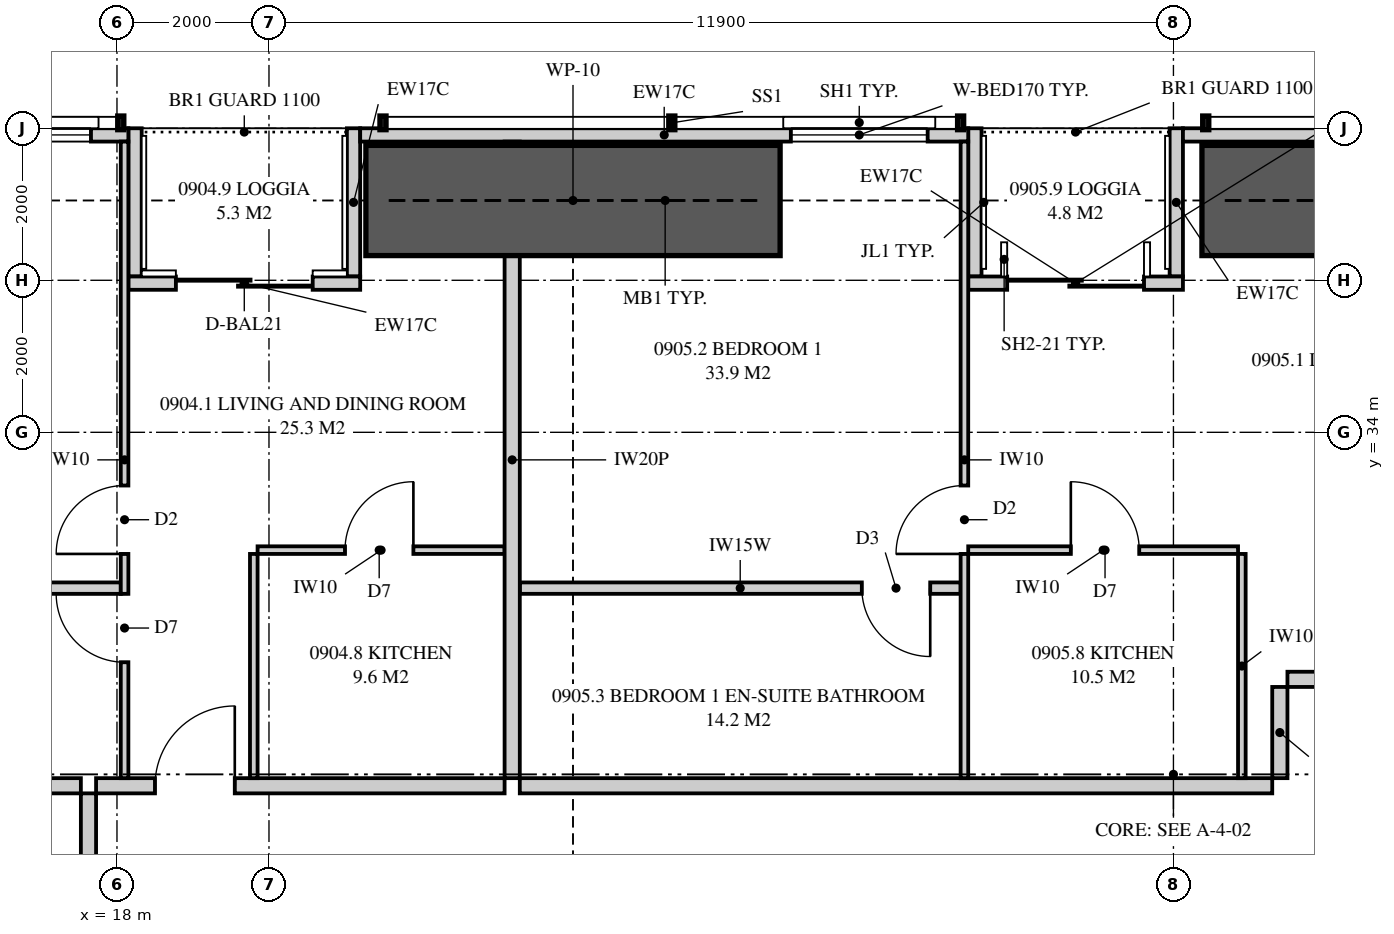
"""IFC4 building model, lengths in metres.
Left out: names, types, materials, properties, quantities, classifications, styles, units other than length and angle.
Written with IfcOpenShell. Run it as: python <this file> out.ifc"""

import sys

from ifc_helpers import new_model, si_unit, direction, frame, frame_2d, origin, place, context, subcontext, project, spatial, polyline, rectangle, outline, extrude, element, fill, save


model = new_model("IFC4")
c1 = context("Model", 3, precision=1e-05, world=origin(), true_north=direction((0.0, 1.0)))
c2 = subcontext(c1, "Body", "Model", "MODEL_VIEW")
j1 = project(units=[si_unit("LENGTHUNIT", "METRE"), si_unit("PLANEANGLEUNIT", "RADIAN")], contexts=[c1])
p1 = place(None, origin())
s1 = spatial("IfcSite", under=j1, at=p1, CompositionType="ELEMENT")
p2 = place(p1, origin())
s2 = spatial("IfcBuilding", under=s1, at=p2, CompositionType="ELEMENT")
p3 = place(p2, frame((0.0, 0.0, 37.75)))
s3 = spatial("IfcBuildingStorey", under=s2, at=p3, CompositionType="ELEMENT", Elevation=37.75)
p4 = place(p3, frame((42.949, 37.913, 0.0), z_axis=(0.0, 0.0, 1.0), x_axis=(-1.0, 0.0, 0.0)))
e1 = element("IfcWall", 1, at=p4, inside=s3, PredefinedType="SOLIDWALL", context=c2, shape_type="SweptSolid", body=[
    extrude(outline(polyline([(0.0, 0.0), (10.924, 0.0), (10.924, 2.15), (7.949, 2.15), (7.949, 3.11), (7.793, 3.11), (7.793, 2.15), (7.745, 2.15), (7.745, 3.11), (0.0, 3.11), (0.0, 0.0)])), frame((0.0, 0.087, 0.0), z_axis=(0.0, -1.0, 0.0), x_axis=(1.0, 0.0, 0.0)), (0.0, 0.0, 1.0), 0.175),
])
p5 = place(p4, frame((2.199, 0.0, 0.4)))
e2 = element("IfcOpeningElement", 2, at=p5, cuts=e1, PredefinedType="OPENING", context=c2, shape_type="SweptSolid", body=[
    extrude(rectangle(XDim=1.8, YDim=1.7, at=frame_2d((0.9, 0.85))), frame((0.0, 0.097, 0.0), z_axis=(0.0, -1.0, 0.0), x_axis=(1.0, 0.0, 0.0)), (0.0, 0.0, 1.0), 0.195),
])
p6 = place(p3, frame((29.2, 37.913, 0.0), z_axis=(0.0, 0.0, 1.0), x_axis=(-1.0, 0.0, 0.0)))
e3 = element("IfcWall", 3, at=p6, inside=s3, PredefinedType="SOLIDWALL", context=c2, shape_type="SweptSolid", body=[
    extrude(rectangle(XDim=8.0, YDim=0.175, at=frame_2d((4.0, 0.0))), origin(), (0.0, 0.0, 1.0), 2.15),
])
p7 = place(p6, frame((0.534, 0.0, 0.4)))
e4 = element("IfcOpeningElement", 4, at=p7, cuts=e3, PredefinedType="OPENING", context=c2, shape_type="SweptSolid", body=[
    extrude(rectangle(XDim=1.8, YDim=1.7, at=frame_2d((0.9, 0.85))), frame((0.0, 0.097, 0.0), z_axis=(0.0, -1.0, 0.0), x_axis=(1.0, 0.0, 0.0)), (0.0, 0.0, 1.0), 0.195),
])
p8 = place(p3, frame((18.15, 37.913, 0.0), z_axis=(0.0, 0.0, 1.0), x_axis=(-1.0, 0.0, 0.0)))
e5 = element("IfcWall", 5, at=p8, inside=s3, PredefinedType="SOLIDWALL", context=c2, shape_type="SweptSolid", body=[
    extrude(outline(polyline([(0.0, 0.0), (13.099, 0.0), (13.099, 3.11), (5.354, 3.11), (5.354, 2.15), (5.306, 2.15), (5.306, 3.11), (5.15, 3.11), (5.15, 2.15), (0.0, 2.15), (0.0, 0.0)])), frame((0.0, 0.087, 0.0), z_axis=(0.0, -1.0, 0.0), x_axis=(1.0, 0.0, 0.0)), (0.0, 0.0, 1.0), 0.175),
])
p9 = place(p8, frame((0.492, 0.0, 0.4)))
e6 = element("IfcOpeningElement", 6, at=p9, cuts=e5, PredefinedType="OPENING", context=c2, shape_type="SweptSolid", body=[
    extrude(rectangle(XDim=1.8, YDim=1.7, at=frame_2d((0.9, 0.85))), frame((0.0, 0.097, 0.0), z_axis=(0.0, -1.0, 0.0), x_axis=(1.0, 0.0, 0.0)), (0.0, 0.0, 1.0), 0.195),
])
p10 = place(p8, frame((7.98, 0.0, 0.4)))
e7 = element("IfcOpeningElement", 7, at=p10, cuts=e5, PredefinedType="OPENING", context=c2, shape_type="SweptSolid", body=[
    extrude(rectangle(XDim=1.8, YDim=1.7, at=frame_2d((0.9, 0.85))), frame((0.0, 0.097, 0.0), z_axis=(0.0, -1.0, 0.0), x_axis=(1.0, 0.0, 0.0)), (0.0, 0.0, 1.0), 0.195),
])
p11 = place(p3, frame((32.025, 35.962, 0.0), z_axis=(0.0, 0.0, 1.0), x_axis=(-1.0, 0.0, 0.0)))
e8 = element("IfcWall", 8, at=p11, inside=s3, PredefinedType="SOLIDWALL", context=c2, shape_type="SweptSolid", body=[
    extrude(rectangle(XDim=2.825, YDim=0.175, at=frame_2d((1.413, 0.0))), origin(), (0.0, 0.0, 1.0), 3.11),
])
p12 = place(p11, frame((0.512, 0.0, 0.0)))
e9 = element("IfcOpeningElement", 9, at=p12, cuts=e8, PredefinedType="OPENING", context=c2, shape_type="SweptSolid", body=[
    extrude(rectangle(XDim=1.8, YDim=2.1, at=frame_2d((0.9, 1.05))), frame((0.0, 0.097, 0.0), z_axis=(0.0, -1.0, 0.0), x_axis=(1.0, 0.0, 0.0)), (0.0, 0.0, 1.0), 0.195),
])
for number, where, z_axis, x_axis in (
    (10, (31.938, 38.0, 0.0), (0.0, 0.0, 1.0), (0.0, -1.0, 0.0)),
    (11, (29.288, 38.0, 0.0), (0.0, 0.0, 1.0), (0.0, -1.0, 0.0)),
):
    element("IfcWall", number, at=place(p3, frame(where, z_axis=z_axis, x_axis=x_axis)), inside=s3, PredefinedType="SOLIDWALL", context=c2, shape_type="SweptSolid", body=[
        extrude(outline(polyline([(0.0, 0.0), (1.95, 0.0), (1.95, 3.11), (1.75, 3.11), (1.75, 2.15), (0.15, 2.15), (0.15, 3.11), (0.0, 3.11), (0.0, 0.0)])), frame((0.0, 0.087, 0.0), z_axis=(0.0, -1.0, 0.0), x_axis=(1.0, 0.0, 0.0)), (0.0, 0.0, 1.0), 0.175),
    ])
p13 = place(p3, frame((21.2, 35.962, 0.0), z_axis=(0.0, 0.0, 1.0), x_axis=(-1.0, 0.0, 0.0)))
e12 = element("IfcWall", 12, at=p13, inside=s3, PredefinedType="SOLIDWALL", context=c2, shape_type="SweptSolid", body=[
    extrude(rectangle(XDim=3.05, YDim=0.175, at=frame_2d((1.525, 0.0))), origin(), (0.0, 0.0, 1.0), 3.11),
])
p14 = place(p13, frame((0.625, 0.0, 0.0)))
e13 = element("IfcOpeningElement", 13, at=p14, cuts=e12, PredefinedType="OPENING", context=c2, shape_type="SweptSolid", body=[
    extrude(rectangle(XDim=1.8, YDim=2.1, at=frame_2d((0.9, 1.05))), frame((0.0, 0.097, 0.0), z_axis=(0.0, -1.0, 0.0), x_axis=(1.0, 0.0, 0.0)), (0.0, 0.0, 1.0), 0.195),
])
for number, where, z_axis, x_axis in (
    (14, (21.113, 38.0, 0.0), (0.0, 0.0, 1.0), (0.0, -1.0, 0.0)),
    (15, (18.238, 38.0, 0.0), (0.0, 0.0, 1.0), (0.0, -1.0, 0.0)),
):
    element("IfcWall", number, at=place(p3, frame(where, z_axis=z_axis, x_axis=x_axis)), inside=s3, PredefinedType="SOLIDWALL", context=c2, shape_type="SweptSolid", body=[
        extrude(outline(polyline([(0.0, 0.0), (1.95, 0.0), (1.95, 3.11), (1.75, 3.11), (1.75, 2.15), (0.15, 2.15), (0.15, 3.11), (0.0, 3.11), (0.0, 0.0)])), frame((0.0, 0.087, 0.0), z_axis=(0.0, -1.0, 0.0), x_axis=(1.0, 0.0, 0.0)), (0.0, 0.0, 1.0), 0.175),
    ])
p15 = place(p3, frame((23.2, 37.825, 0.0), z_axis=(0.0, 0.0, 1.0), x_axis=(0.0, -1.0, 0.0)))
e16 = element("IfcWall", 16, at=p15, inside=s3, PredefinedType="PARTITIONING", context=c2, shape_type="SweptSolid", body=[
    extrude(outline(polyline([(0.529, 2.15), (0.0, 2.15), (0.0, 0.0), (0.529, 0.0), (0.529, 0.953), (1.021, 0.953), (1.021, 0.0), (8.375, 0.0), (8.375, 3.11), (1.685, 3.11), (1.685, 2.15), (1.021, 2.15), (1.021, 1.197), (0.529, 1.197), (0.529, 2.15)])), frame((0.0, 0.1, 0.0), z_axis=(0.0, -1.0, 0.0), x_axis=(1.0, 0.0, 0.0)), (0.0, 0.0, 1.0), 0.2),
])
p16 = place(p3, frame((17.725, 29.35, 0.0), z_axis=(0.0, 0.0, 1.0), x_axis=(1.0, 0.0, 0.0)))
e17 = element("IfcWall", 17, at=p16, inside=s3, PredefinedType="PARTITIONING", context=c2, shape_type="SweptSolid", body=[
    extrude(rectangle(XDim=5.375, YDim=0.2, at=frame_2d((2.688, 0.0))), origin(), (0.0, 0.0, 1.0), 3.11),
])
p17 = place(p16, frame((0.775, 0.0, 0.0)))
e18 = element("IfcOpeningElement", 18, at=p17, cuts=e17, PredefinedType="OPENING", context=c2, shape_type="SweptSolid", body=[
    extrude(rectangle(XDim=1.05, YDim=2.2, at=frame_2d((0.525, 1.1))), frame((0.0, 0.11, 0.0), z_axis=(0.0, -1.0, 0.0), x_axis=(1.0, 0.0, 0.0)), (0.0, 0.0, 1.0), 0.22),
])
p18 = place(p3, frame((18.1, 37.825, 0.0), z_axis=(0.0, 0.0, 1.0), x_axis=(0.0, -1.0, 0.0)))
e19 = element("IfcWall", 19, at=p18, inside=s3, PredefinedType="PARTITIONING", context=c2, shape_type="SweptSolid", body=[
    extrude(outline(polyline([(0.0, 0.0), (8.375, 0.0), (8.375, 3.11), (1.635, 3.11), (1.635, 2.15), (0.0, 2.15), (0.0, 3.11), (0.0, 0.0)])), frame((0.0, 0.05, 0.0), z_axis=(0.0, -1.0, 0.0), x_axis=(1.0, 0.0, 0.0)), (0.0, 0.0, 1.0), 0.1),
])
p19 = place(p18, frame((4.525, 0.0, 0.0)))
e20 = element("IfcOpeningElement", 20, at=p19, cuts=e19, PredefinedType="OPENING", context=c2, shape_type="SweptSolid", body=[
    extrude(rectangle(XDim=0.9, YDim=2.1, at=frame_2d((0.45, 1.05))), frame((0.0, 0.06, 0.0), z_axis=(0.0, -1.0, 0.0), x_axis=(1.0, 0.0, 0.0)), (0.0, 0.0, 1.0), 0.12),
])
p20 = place(p18, frame((5.95, 0.0, 0.0)))
e21 = element("IfcOpeningElement", 21, at=p20, cuts=e19, PredefinedType="OPENING", context=c2, shape_type="SweptSolid", body=[
    extrude(rectangle(XDim=0.9, YDim=2.1, at=frame_2d((0.45, 1.05))), frame((0.0, 0.06, 0.0), z_axis=(0.0, -1.0, 0.0), x_axis=(1.0, 0.0, 0.0)), (0.0, 0.0, 1.0), 0.12),
])
p21 = place(p3, frame((13.85, 31.95, 0.0), z_axis=(0.0, 0.0, 1.0), x_axis=(1.0, 0.0, 0.0)))
e22 = element("IfcWall", 22, at=p21, inside=s3, PredefinedType="PLUMBINGWALL", context=c2, shape_type="SweptSolid", body=[
    extrude(rectangle(XDim=4.2, YDim=0.15, at=frame_2d((2.1, 0.0))), origin(), (0.0, 0.0, 1.0), 3.11),
])
p22 = place(p3, frame((19.85, 32.45, 0.0), z_axis=(0.0, 0.0, 1.0), x_axis=(1.0, 0.0, 0.0)))
e23 = element("IfcWall", 23, at=p22, inside=s3, PredefinedType="PARTITIONING", context=c2, shape_type="SweptSolid", body=[
    extrude(rectangle(XDim=3.25, YDim=0.1, at=frame_2d((1.625, 0.0))), origin(), (0.0, 0.0, 1.0), 3.11),
])
p23 = place(p22, frame((1.15, 0.0, 0.0)))
e24 = element("IfcOpeningElement", 24, at=p23, cuts=e23, PredefinedType="OPENING", context=c2, shape_type="SweptSolid", body=[
    extrude(rectangle(XDim=0.9, YDim=2.1, at=frame_2d((0.45, 1.05))), frame((0.0, 0.06, 0.0), z_axis=(0.0, -1.0, 0.0), x_axis=(1.0, 0.0, 0.0)), (0.0, 0.0, 1.0), 0.12),
])
p24 = place(p3, frame((19.8, 32.4, 0.0), z_axis=(0.0, 0.0, 1.0), x_axis=(0.0, -1.0, 0.0)))
e25 = element("IfcWall", 25, at=p24, inside=s3, PredefinedType="PARTITIONING", context=c2, shape_type="SweptSolid", body=[
    extrude(rectangle(XDim=2.95, YDim=0.1, at=frame_2d((1.475, 0.0))), origin(), (0.0, 0.0, 1.0), 3.11),
])
p25 = place(p3, frame((23.3, 29.35, 0.0), z_axis=(0.0, 0.0, 1.0), x_axis=(1.0, 0.0, 0.0)))
e26 = element("IfcWall", 26, at=p25, inside=s3, PredefinedType="PARTITIONING", context=c2, shape_type="SweptSolid", body=[
    extrude(outline(polyline([(0.0, 0.0), (9.9, 0.0), (9.9, 3.11), (1.037, 3.11), (1.037, 2.541), (0.363, 2.541), (0.363, 3.11), (0.0, 3.11), (0.0, 0.0)])), frame((0.0, 0.1, 0.0), z_axis=(0.0, -1.0, 0.0), x_axis=(1.0, 0.0, 0.0)), (0.0, 0.0, 1.0), 0.2),
])
p26 = place(p3, frame((29.15, 37.825, 0.0), z_axis=(0.0, 0.0, 1.0), x_axis=(0.0, -1.0, 0.0)))
e27 = element("IfcWall", 27, at=p26, inside=s3, PredefinedType="PARTITIONING", context=c2, shape_type="SweptSolid", body=[
    extrude(outline(polyline([(0.0, 0.0), (8.375, 0.0), (8.375, 3.11), (1.635, 3.11), (1.635, 2.15), (0.0, 2.15), (0.0, 3.11), (0.0, 0.0)])), frame((0.0, 0.05, 0.0), z_axis=(0.0, -1.0, 0.0), x_axis=(1.0, 0.0, 0.0)), (0.0, 0.0, 1.0), 0.1),
])
p27 = place(p26, frame((4.525, 0.0, 0.0)))
e28 = element("IfcOpeningElement", 28, at=p27, cuts=e27, PredefinedType="OPENING", context=c2, shape_type="SweptSolid", body=[
    extrude(rectangle(XDim=0.9, YDim=2.1, at=frame_2d((0.45, 1.05))), frame((0.0, 0.06, 0.0), z_axis=(0.0, -1.0, 0.0), x_axis=(1.0, 0.0, 0.0)), (0.0, 0.0, 1.0), 0.12),
])
p28 = place(p3, frame((23.3, 31.95, 0.0), z_axis=(0.0, 0.0, 1.0), x_axis=(1.0, 0.0, 0.0)))
e29 = element("IfcWall", 29, at=p28, inside=s3, PredefinedType="PLUMBINGWALL", context=c2, shape_type="SweptSolid", body=[
    extrude(outline(polyline([(0.0, 0.0), (5.8, 0.0), (5.8, 3.11), (1.012, 3.11), (1.012, 2.541), (0.388, 2.541), (0.388, 3.11), (0.0, 3.11), (0.0, 0.0)])), frame((0.0, 0.075, 0.0), z_axis=(0.0, -1.0, 0.0), x_axis=(1.0, 0.0, 0.0)), (0.0, 0.0, 1.0), 0.15),
])
p29 = place(p28, frame((4.5, 0.0, 0.0)))
e30 = element("IfcOpeningElement", 30, at=p29, cuts=e29, PredefinedType="OPENING", context=c2, shape_type="SweptSolid", body=[
    extrude(rectangle(XDim=0.9, YDim=2.1, at=frame_2d((0.45, 1.05))), frame((0.0, 0.085, 0.0), z_axis=(0.0, -1.0, 0.0), x_axis=(1.0, 0.0, 0.0)), (0.0, 0.0, 1.0), 0.17),
])
p30 = place(p3, frame((29.2, 32.45, 0.0), z_axis=(0.0, 0.0, 1.0), x_axis=(1.0, 0.0, 0.0)))
e31 = element("IfcWall", 31, at=p30, inside=s3, PredefinedType="PARTITIONING", context=c2, shape_type="SweptSolid", body=[
    extrude(rectangle(XDim=3.55, YDim=0.1, at=frame_2d((1.775, 0.0))), origin(), (0.0, 0.0, 1.0), 3.11),
])
p31 = place(p30, frame((1.35, 0.0, 0.0)))
e32 = element("IfcOpeningElement", 32, at=p31, cuts=e31, PredefinedType="OPENING", context=c2, shape_type="SweptSolid", body=[
    extrude(rectangle(XDim=0.9, YDim=2.1, at=frame_2d((0.45, 1.05))), frame((0.0, 0.06, 0.0), z_axis=(0.0, -1.0, 0.0), x_axis=(1.0, 0.0, 0.0)), (0.0, 0.0, 1.0), 0.12),
])
p32 = place(p3, frame((32.8, 32.4, 0.0), z_axis=(0.0, 0.0, 1.0), x_axis=(0.0, -1.0, 0.0)))
e33 = element("IfcWall", 33, at=p32, inside=s3, PredefinedType="PARTITIONING", context=c2, shape_type="SweptSolid", body=[
    extrude(rectangle(XDim=2.95, YDim=0.1, at=frame_2d((1.475, 0.0))), origin(), (0.0, 0.0, 1.0), 3.11),
])
p33 = place(p3, frame((2.0, 29.35, 0.0), z_axis=(0.0, 0.0, 1.0), x_axis=(1.0, 0.0, 0.0)))
e34 = element("IfcWall", 34, at=p33, inside=s3, PredefinedType="PARTITIONING", context=c2, shape_type="SweptSolid", body=[
    extrude(outline(polyline([(0.0, 0.0), (15.525, 0.0), (15.525, 3.11), (11.337, 3.11), (11.337, 2.541), (10.663, 2.541), (10.663, 3.11), (9.51, 3.11), (9.51, 2.51), (6.89, 2.51), (6.89, 3.11), (2.969, 3.11), (2.969, 2.541), (2.577, 2.541), (2.577, 2.15), (0.733, 2.15), (0.733, 3.11), (0.0, 3.11), (0.0, 0.0)])), frame((0.0, 0.1, 0.0), z_axis=(0.0, -1.0, 0.0), x_axis=(1.0, 0.0, 0.0)), (0.0, 0.0, 1.0), 0.2),
])
p34 = place(p3, frame((17.625, 24.1, 0.0), z_axis=(0.0, 0.0, 1.0), x_axis=(0.0, 1.0, 0.0)))
e35 = element("IfcWall", 35, at=p34, inside=s3, PredefinedType="PARTITIONING", context=c2, shape_type="SweptSolid", body=[
    extrude(outline(polyline([(0.0, 0.0), (5.15, 0.0), (5.15, 3.11), (1.237, 3.11), (1.237, 2.541), (0.562, 2.541), (0.562, 3.11), (0.0, 3.11), (0.0, 0.0)])), frame((0.0, 0.1, 0.0), z_axis=(0.0, -1.0, 0.0), x_axis=(1.0, 0.0, 0.0)), (0.0, 0.0, 1.0), 0.2),
])
p35 = place(p34, frame((1.675, 0.0, 0.0)))
e36 = element("IfcOpeningElement", 36, at=p35, cuts=e35, PredefinedType="OPENING", context=c2, shape_type="SweptSolid", body=[
    extrude(rectangle(XDim=1.8, YDim=2.1, at=frame_2d((0.9, 1.05))), frame((0.0, 0.11, 0.0), z_axis=(0.0, -1.0, 0.0), x_axis=(1.0, 0.0, 0.0)), (0.0, 0.0, 1.0), 0.22),
])
p36 = place(p3, frame((33.4, 30.75, 0.0), z_axis=(0.0, 0.0, 1.0), x_axis=(1.0, 0.0, 0.0)))
e37 = element("IfcWall", 37, at=p36, inside=s3, PredefinedType="PARTITIONING", context=c2, shape_type="SweptSolid", body=[
    extrude(outline(polyline([(0.0, 0.0), (2.4, 0.0), (2.4, 3.11), (1.938, 3.11), (1.938, 2.541), (1.263, 2.541), (1.263, 3.11), (0.0, 3.11), (0.0, 0.0)])), frame((0.0, 0.1, 0.0), z_axis=(0.0, -1.0, 0.0), x_axis=(1.0, 0.0, 0.0)), (0.0, 0.0, 1.0), 0.2),
])
p37 = place(p36, frame((0.7, 0.0, 0.0)))
e38 = element("IfcOpeningElement", 38, at=p37, cuts=e37, PredefinedType="OPENING", context=c2, shape_type="SweptSolid", body=[
    extrude(rectangle(XDim=1.05, YDim=2.2, at=frame_2d((0.525, 1.1))), frame((0.0, 0.11, 0.0), z_axis=(0.0, -1.0, 0.0), x_axis=(1.0, 0.0, 0.0)), (0.0, 0.0, 1.0), 0.22),
])
p38 = place(p3, frame((33.3, 29.45, 0.0), z_axis=(0.0, 0.0, 1.0), x_axis=(0.0, 1.0, 0.0)))
e39 = element("IfcWall", 39, at=p38, inside=s3, PredefinedType="PARTITIONING", context=c2, shape_type="SweptSolid", body=[
    extrude(rectangle(XDim=1.2, YDim=0.2, at=frame_2d((0.6, 0.0))), origin(), (0.0, 0.0, 1.0), 3.11),
])
for number, where, z_axis, x_axis in (
    (40, (32.275, 37.05, 0.0), (0.0, 0.0, 1.0), (1.0, 0.0, 0.0)),
    (41, (21.275, 37.05, 0.0), (0.0, 0.0, 1.0), (1.0, 0.0, 0.0)),
):
    element("IfcWall", number, at=place(p3, frame(where, z_axis=z_axis, x_axis=x_axis)), inside=s3, PredefinedType="SHEAR", context=c2, shape_type="SweptSolid", body=[
        extrude(rectangle(XDim=5.45, YDim=1.45, at=frame_2d((2.725, 0.0))), origin(), (0.0, 0.0, 1.0), 3.35),
    ])
p39 = place(p12, origin())
e42 = element("IfcDoor", 42, at=p39, inside=s3, OperationType="SLIDING_TO_LEFT", PredefinedType="DOOR", context=c2, shape_type="SweptSolid", body=[
    extrude(rectangle(XDim=1.8, YDim=2.1, at=frame_2d((0.9, 1.05))), frame((0.0, 0.025, 0.0), z_axis=(0.0, -1.0, 0.0), x_axis=(1.0, 0.0, 0.0)), (0.0, 0.0, 1.0), 0.05),
])
fill(e9, e42)
p40 = place(p7, origin())
e43 = element("IfcWindow", 43, at=p40, inside=s3, PartitioningType="SINGLE_PANEL", PredefinedType="WINDOW", context=c2, shape_type="SweptSolid", body=[
    extrude(rectangle(XDim=1.8, YDim=1.7, at=frame_2d((0.9, 0.85))), frame((0.0, 0.03, 0.0), z_axis=(0.0, -1.0, 0.0), x_axis=(1.0, 0.0, 0.0)), (0.0, 0.0, 1.0), 0.06),
])
fill(e4, e43)
p41 = place(p14, origin())
e44 = element("IfcDoor", 44, at=p41, inside=s3, OperationType="SLIDING_TO_LEFT", PredefinedType="DOOR", context=c2, shape_type="SweptSolid", body=[
    extrude(rectangle(XDim=1.8, YDim=2.1, at=frame_2d((0.9, 1.05))), frame((0.0, 0.025, 0.0), z_axis=(0.0, -1.0, 0.0), x_axis=(1.0, 0.0, 0.0)), (0.0, 0.0, 1.0), 0.05),
])
fill(e13, e44)
p42 = place(p9, origin())
e45 = element("IfcWindow", 45, at=p42, inside=s3, PartitioningType="SINGLE_PANEL", PredefinedType="WINDOW", context=c2, shape_type="SweptSolid", body=[
    extrude(rectangle(XDim=1.8, YDim=1.7, at=frame_2d((0.9, 0.85))), frame((0.0, 0.03, 0.0), z_axis=(0.0, -1.0, 0.0), x_axis=(1.0, 0.0, 0.0)), (0.0, 0.0, 1.0), 0.06),
])
fill(e6, e45)
p43 = place(p17, origin())
e46 = element("IfcDoor", 46, at=p43, inside=s3, OperationType="SINGLE_SWING_RIGHT", PredefinedType="DOOR", context=c2, shape_type="SweptSolid", body=[
    extrude(rectangle(XDim=1.05, YDim=2.2, at=frame_2d((0.525, 1.1))), frame((0.0, 0.025, 0.0), z_axis=(0.0, -1.0, 0.0), x_axis=(1.0, 0.0, 0.0)), (0.0, 0.0, 1.0), 0.05),
])
fill(e18, e46)
p44 = place(p19, frame((0.9, 0.0, 0.0), z_axis=(0.0, 0.0, 1.0), x_axis=(-1.0, 0.0, 0.0)))
e47 = element("IfcDoor", 47, at=p44, inside=s3, OperationType="SINGLE_SWING_LEFT", PredefinedType="DOOR", context=c2, shape_type="SweptSolid", body=[
    extrude(rectangle(XDim=0.9, YDim=2.1, at=frame_2d((0.45, 1.05))), frame((0.0, 0.025, 0.0), z_axis=(0.0, -1.0, 0.0), x_axis=(1.0, 0.0, 0.0)), (0.0, 0.0, 1.0), 0.05),
])
fill(e20, e47)
p45 = place(p20, frame((0.9, 0.0, 0.0), z_axis=(0.0, 0.0, 1.0), x_axis=(-1.0, 0.0, 0.0)))
e48 = element("IfcDoor", 48, at=p45, inside=s3, OperationType="SINGLE_SWING_RIGHT", PredefinedType="DOOR", context=c2, shape_type="SweptSolid", body=[
    extrude(rectangle(XDim=0.9, YDim=2.1, at=frame_2d((0.45, 1.05))), frame((0.0, 0.025, 0.0), z_axis=(0.0, -1.0, 0.0), x_axis=(1.0, 0.0, 0.0)), (0.0, 0.0, 1.0), 0.05),
])
fill(e21, e48)
p46 = place(p23, origin())
e49 = element("IfcDoor", 49, at=p46, inside=s3, OperationType="SINGLE_SWING_RIGHT", PredefinedType="DOOR", context=c2, shape_type="SweptSolid", body=[
    extrude(rectangle(XDim=0.9, YDim=2.1, at=frame_2d((0.45, 1.05))), frame((0.0, 0.025, 0.0), z_axis=(0.0, -1.0, 0.0), x_axis=(1.0, 0.0, 0.0)), (0.0, 0.0, 1.0), 0.05),
])
fill(e24, e49)
p47 = place(p27, frame((0.9, 0.0, 0.0), z_axis=(0.0, 0.0, 1.0), x_axis=(-1.0, 0.0, 0.0)))
e50 = element("IfcDoor", 50, at=p47, inside=s3, OperationType="SINGLE_SWING_LEFT", PredefinedType="DOOR", context=c2, shape_type="SweptSolid", body=[
    extrude(rectangle(XDim=0.9, YDim=2.1, at=frame_2d((0.45, 1.05))), frame((0.0, 0.025, 0.0), z_axis=(0.0, -1.0, 0.0), x_axis=(1.0, 0.0, 0.0)), (0.0, 0.0, 1.0), 0.05),
])
fill(e28, e50)
p48 = place(p29, frame((0.9, 0.0, 0.0), z_axis=(0.0, 0.0, 1.0), x_axis=(-1.0, 0.0, 0.0)))
e51 = element("IfcDoor", 51, at=p48, inside=s3, OperationType="SINGLE_SWING_LEFT", PredefinedType="DOOR", context=c2, shape_type="SweptSolid", body=[
    extrude(rectangle(XDim=0.9, YDim=2.1, at=frame_2d((0.45, 1.05))), frame((0.0, 0.025, 0.0), z_axis=(0.0, -1.0, 0.0), x_axis=(1.0, 0.0, 0.0)), (0.0, 0.0, 1.0), 0.05),
])
fill(e30, e51)
p49 = place(p31, origin())
e52 = element("IfcDoor", 52, at=p49, inside=s3, OperationType="SINGLE_SWING_LEFT", PredefinedType="DOOR", context=c2, shape_type="SweptSolid", body=[
    extrude(rectangle(XDim=0.9, YDim=2.1, at=frame_2d((0.45, 1.05))), frame((0.0, 0.025, 0.0), z_axis=(0.0, -1.0, 0.0), x_axis=(1.0, 0.0, 0.0)), (0.0, 0.0, 1.0), 0.05),
])
fill(e32, e52)
save(model, sys.argv[1])
